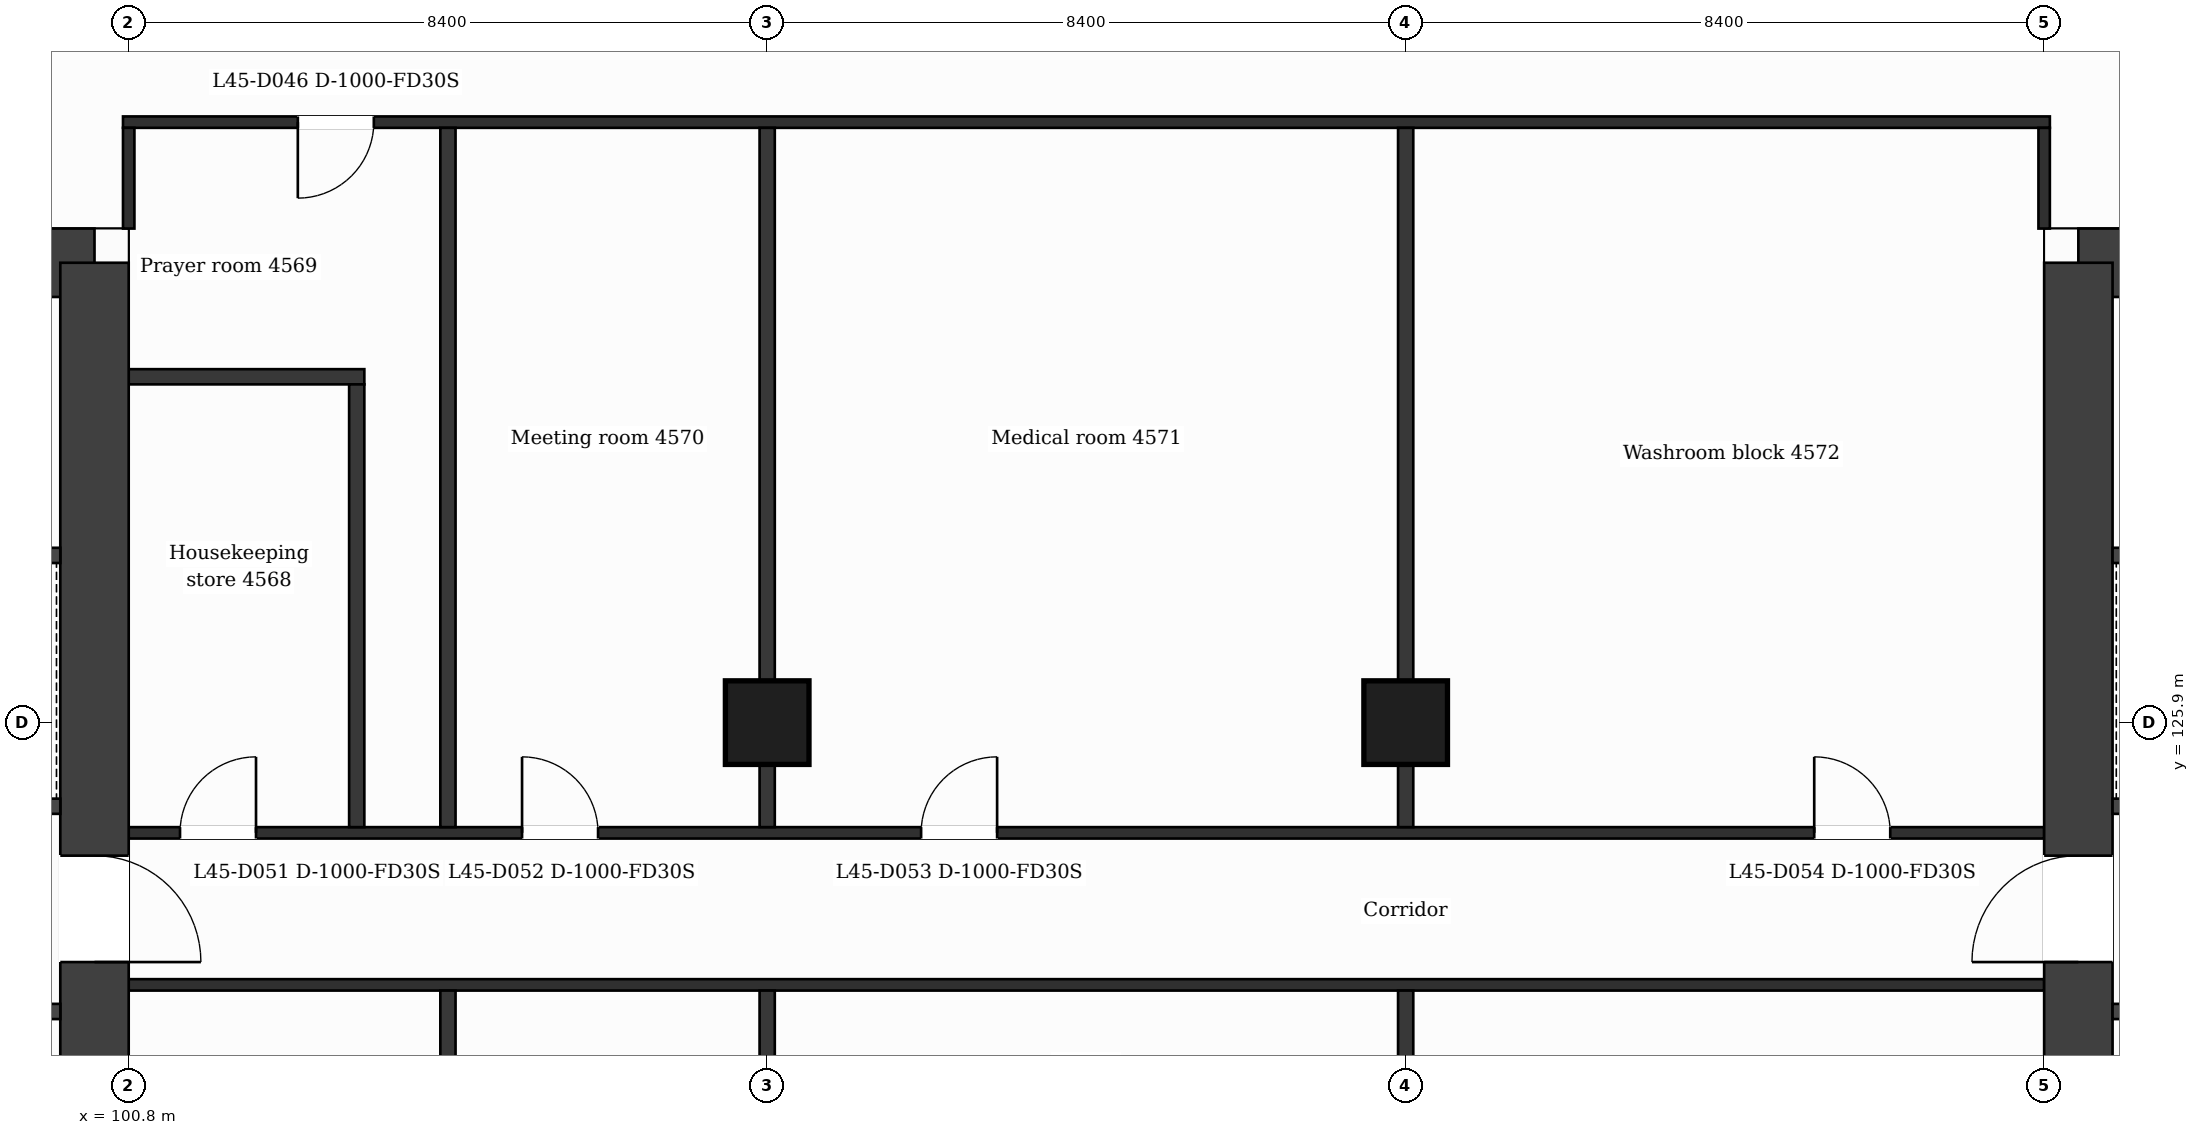
"""IFC4 building model, lengths in metres.
Left out: names, types, materials, properties, quantities, classifications, styles, units other than length and angle.
Written with IfcOpenShell. Run it as: python <this file> out.ifc"""

import sys

from ifc_helpers import new_model, si_unit, direction, frame, frame_2d, origin, origin_2d, place, context, subcontext, project, spatial, rectangle, extrude, element, fill, save


model = new_model("IFC4")
c1 = context("Model", 3, precision=1e-05, world=origin(), true_north=direction((0.0, 1.0)))
c2 = subcontext(c1, "Body", "Model", "MODEL_VIEW")
j1 = project(units=[si_unit("LENGTHUNIT", "METRE"), si_unit("PLANEANGLEUNIT", "RADIAN")], contexts=[c1])
p1 = place(None, origin())
s1 = spatial("IfcSite", under=j1, at=p1, CompositionType="ELEMENT")
p2 = place(p1, origin())
s2 = spatial("IfcBuilding", under=s1, at=p2, CompositionType="ELEMENT")
p3 = place(p2, frame((0.0, 0.0, 188.5)))
s3 = spatial("IfcBuildingStorey", under=s2, at=p3, CompositionType="ELEMENT", Elevation=188.5)
p4 = place(p3, frame((89.024, 131.95, 0.0), z_axis=(0.0, 0.0, 1.0), x_axis=(1.0, 0.0, 0.0)))
e1 = element("IfcWall", 1, at=p4, inside=s3, PredefinedType="SHEAR", context=c2, shape_type="SweptSolid", body=[
    extrude(rectangle(XDim=11.326, YDim=0.9, at=frame_2d((5.663, 0.0))), origin(), (0.0, 0.0, 1.0), 3.7),
])
p5 = place(p4, frame((6.739, 0.0, 0.0)))
e2 = element("IfcOpeningElement", 2, at=p5, cuts=e1, PredefinedType="OPENING", context=c2, shape_type="SweptSolid", body=[
    extrude(rectangle(XDim=1.2, YDim=2.1, at=frame_2d((0.6, 1.05))), frame((0.0, 0.46, 0.0), z_axis=(0.0, -1.0, 0.0), x_axis=(1.0, 0.0, 0.0)), (0.0, 0.0, 1.0), 0.92),
])
p6 = place(p3, frame((100.35, 131.95, 0.0), z_axis=(0.0, 0.0, 1.0), x_axis=(0.0, -1.0, 0.0)))
e3 = element("IfcWall", 3, at=p6, inside=s3, PredefinedType="SHEAR", context=c2, shape_type="SweptSolid", body=[
    extrude(rectangle(XDim=21.1, YDim=0.9, at=frame_2d((10.55, 0.0))), origin(), (0.0, 0.0, 1.0), 3.7),
])
p7 = place(p6, frame((7.8, 0.0, 0.0)))
e4 = element("IfcOpeningElement", 4, at=p7, cuts=e3, PredefinedType="OPENING", context=c2, shape_type="SweptSolid", body=[
    extrude(rectangle(XDim=1.4, YDim=2.1, at=frame_2d((0.7, 1.05))), frame((0.0, 0.46, 0.0), z_axis=(0.0, -1.0, 0.0), x_axis=(1.0, 0.0, 0.0)), (0.0, 0.0, 1.0), 0.92),
])
p8 = place(p3, frame((126.45, 131.95, 0.0), z_axis=(0.0, 0.0, 1.0), x_axis=(1.0, 0.0, 0.0)))
e5 = element("IfcWall", 5, at=p8, inside=s3, PredefinedType="SHEAR", context=c2, shape_type="SweptSolid", body=[
    extrude(rectangle(XDim=11.326, YDim=0.9, at=frame_2d((5.663, 0.0))), origin(), (0.0, 0.0, 1.0), 3.7),
])
p9 = place(p8, frame((3.386, 0.0, 0.0)))
e6 = element("IfcOpeningElement", 6, at=p9, cuts=e5, PredefinedType="OPENING", context=c2, shape_type="SweptSolid", body=[
    extrude(rectangle(XDim=1.2, YDim=2.1, at=frame_2d((0.6, 1.05))), frame((0.0, 0.46, 0.0), z_axis=(0.0, -1.0, 0.0), x_axis=(1.0, 0.0, 0.0)), (0.0, 0.0, 1.0), 0.92),
])
p10 = place(p3, frame((126.45, 110.85, 0.0), z_axis=(0.0, 0.0, 1.0), x_axis=(0.0, 1.0, 0.0)))
e7 = element("IfcWall", 7, at=p10, inside=s3, PredefinedType="SHEAR", context=c2, shape_type="SweptSolid", body=[
    extrude(rectangle(XDim=21.1, YDim=0.9, at=frame_2d((10.55, 0.0))), origin(), (0.0, 0.0, 1.0), 3.7),
])
p11 = place(p10, frame((11.9, 0.0, 0.0)))
e8 = element("IfcOpeningElement", 8, at=p11, cuts=e7, PredefinedType="OPENING", context=c2, shape_type="SweptSolid", body=[
    extrude(rectangle(XDim=1.4, YDim=2.1, at=frame_2d((0.7, 1.05))), frame((0.0, 0.46, 0.0), z_axis=(0.0, -1.0, 0.0), x_axis=(1.0, 0.0, 0.0)), (0.0, 0.0, 1.0), 0.92),
])
for number, where, z_axis, x_axis in (
    (9, (109.2, 125.9, 0.0), (0.0, 0.0, 1.0), (1.0, 0.0, 0.0)),
    (10, (117.6, 125.9, 0.0), (0.0, 0.0, 1.0), (1.0, 0.0, 0.0)),
):
    element("IfcColumn", number, at=place(p3, frame(where, z_axis=z_axis, x_axis=x_axis)), inside=s3, PredefinedType="COLUMN", context=c2, shape_type="SweptSolid", body=[
        extrude(rectangle(XDim=1.1, YDim=1.1, at=origin_2d()), origin(), (0.0, 0.0, 1.0), 3.7),
    ])
p12 = place(p3, frame((95.227, 122.1, 0.0), z_axis=(0.0, 0.0, 1.0), x_axis=(1.0, 0.0, 0.0)))
e11 = element("IfcWall", 11, at=p12, inside=s3, PredefinedType="PARTITIONING", context=c2, shape_type="SweptSolid", body=[
    extrude(rectangle(XDim=4.673, YDim=0.2, at=frame_2d((2.336, 0.0))), origin(), (0.0, 0.0, 1.0), 3.25),
])
p13 = place(p12, frame((1.579, 0.0, 0.0)))
e12 = element("IfcOpeningElement", 12, at=p13, cuts=e11, PredefinedType="OPENING", context=c2, shape_type="SweptSolid", body=[
    extrude(rectangle(XDim=0.9, YDim=2.1, at=frame_2d((0.45, 1.05))), frame((0.0, 0.11, 0.0), z_axis=(0.0, -1.0, 0.0), x_axis=(1.0, 0.0, 0.0)), (0.0, 0.0, 1.0), 0.22),
])
p14 = place(p3, frame((126.9, 122.1, 0.0), z_axis=(0.0, 0.0, 1.0), x_axis=(1.0, 0.0, 0.0)))
e13 = element("IfcWall", 13, at=p14, inside=s3, PredefinedType="PARTITIONING", context=c2, shape_type="SweptSolid", body=[
    extrude(rectangle(XDim=4.673, YDim=0.2, at=frame_2d((2.336, 0.0))), origin(), (0.0, 0.0, 1.0), 3.25),
])
p15 = place(p14, frame((1.579, 0.0, 0.0)))
e14 = element("IfcOpeningElement", 14, at=p15, cuts=e13, PredefinedType="OPENING", context=c2, shape_type="SweptSolid", body=[
    extrude(rectangle(XDim=0.9, YDim=2.1, at=frame_2d((0.45, 1.05))), frame((0.0, 0.11, 0.0), z_axis=(0.0, -1.0, 0.0), x_axis=(1.0, 0.0, 0.0)), (0.0, 0.0, 1.0), 0.22),
])
p16 = place(p3, frame((100.8, 122.45, 0.0), z_axis=(0.0, 0.0, 1.0), x_axis=(1.0, 0.0, 0.0)))
e15 = element("IfcWall", 15, at=p16, inside=s3, PredefinedType="PARTITIONING", context=c2, shape_type="SweptSolid", body=[
    extrude(rectangle(XDim=25.2, YDim=0.15, at=frame_2d((12.6, 0.0))), origin(), (0.0, 0.0, 1.0), 3.25),
])
p17 = place(p3, frame((100.8, 124.45, 0.0), z_axis=(0.0, 0.0, 1.0), x_axis=(1.0, 0.0, 0.0)))
e16 = element("IfcWall", 16, at=p17, inside=s3, PredefinedType="PARTITIONING", context=c2, shape_type="SweptSolid", body=[
    extrude(rectangle(XDim=25.2, YDim=0.15, at=frame_2d((12.6, 0.0))), origin(), (0.0, 0.0, 1.0), 3.25),
])
p18 = place(p17, frame((0.675, 0.0, 0.0)))
e17 = element("IfcOpeningElement", 17, at=p18, cuts=e16, PredefinedType="OPENING", context=c2, shape_type="SweptSolid", body=[
    extrude(rectangle(XDim=1.0, YDim=2.1, at=frame_2d((0.5, 1.05))), frame((0.0, 0.085, 0.0), z_axis=(0.0, -1.0, 0.0), x_axis=(1.0, 0.0, 0.0)), (0.0, 0.0, 1.0), 0.17),
])
p19 = place(p17, frame((5.175, 0.0, 0.0)))
e18 = element("IfcOpeningElement", 18, at=p19, cuts=e16, PredefinedType="OPENING", context=c2, shape_type="SweptSolid", body=[
    extrude(rectangle(XDim=1.0, YDim=2.1, at=frame_2d((0.5, 1.05))), frame((0.0, 0.085, 0.0), z_axis=(0.0, -1.0, 0.0), x_axis=(1.0, 0.0, 0.0)), (0.0, 0.0, 1.0), 0.17),
])
p20 = place(p17, frame((10.425, 0.0, 0.0)))
e19 = element("IfcOpeningElement", 19, at=p20, cuts=e16, PredefinedType="OPENING", context=c2, shape_type="SweptSolid", body=[
    extrude(rectangle(XDim=1.0, YDim=2.1, at=frame_2d((0.5, 1.05))), frame((0.0, 0.085, 0.0), z_axis=(0.0, -1.0, 0.0), x_axis=(1.0, 0.0, 0.0)), (0.0, 0.0, 1.0), 0.17),
])
p21 = place(p17, frame((22.175, 0.0, 0.0)))
e20 = element("IfcOpeningElement", 20, at=p21, cuts=e16, PredefinedType="OPENING", context=c2, shape_type="SweptSolid", body=[
    extrude(rectangle(XDim=1.0, YDim=2.1, at=frame_2d((0.5, 1.05))), frame((0.0, 0.085, 0.0), z_axis=(0.0, -1.0, 0.0), x_axis=(1.0, 0.0, 0.0)), (0.0, 0.0, 1.0), 0.17),
])
p22 = place(p3, frame((92.702, 124.8, 0.0), z_axis=(0.0, 0.0, 1.0), x_axis=(1.0, 0.0, 0.0)))
e21 = element("IfcWall", 21, at=p22, inside=s3, PredefinedType="PARTITIONING", context=c2, shape_type="SweptSolid", body=[
    extrude(rectangle(XDim=7.198, YDim=0.2, at=frame_2d((3.599, 0.0))), origin(), (0.0, 0.0, 1.0), 3.25),
])
p23 = place(p22, frame((5.609, 0.0, 0.0)))
e22 = element("IfcOpeningElement", 22, at=p23, cuts=e21, PredefinedType="OPENING", context=c2, shape_type="SweptSolid", body=[
    extrude(rectangle(XDim=1.1, YDim=2.1, at=frame_2d((0.55, 1.05))), frame((0.0, 0.11, 0.0), z_axis=(0.0, -1.0, 0.0), x_axis=(1.0, 0.0, 0.0)), (0.0, 0.0, 1.0), 0.22),
])
p24 = place(p3, frame((126.9, 124.8, 0.0), z_axis=(0.0, 0.0, 1.0), x_axis=(1.0, 0.0, 0.0)))
e23 = element("IfcWall", 23, at=p24, inside=s3, PredefinedType="PARTITIONING", context=c2, shape_type="SweptSolid", body=[
    extrude(rectangle(XDim=4.715, YDim=0.2, at=frame_2d((2.358, 0.0))), origin(), (0.0, 0.0, 1.0), 3.25),
])
p25 = place(p24, frame((0.573, 0.0, 0.0)))
e24 = element("IfcOpeningElement", 24, at=p25, cuts=e23, PredefinedType="OPENING", context=c2, shape_type="SweptSolid", body=[
    extrude(rectangle(XDim=1.1, YDim=2.1, at=frame_2d((0.55, 1.05))), frame((0.0, 0.11, 0.0), z_axis=(0.0, -1.0, 0.0), x_axis=(1.0, 0.0, 0.0)), (0.0, 0.0, 1.0), 0.22),
])
p26 = place(p3, frame((92.827, 128.1, 0.0), z_axis=(0.0, 0.0, 1.0), x_axis=(1.0, 0.0, 0.0)))
e25 = element("IfcWall", 25, at=p26, inside=s3, PredefinedType="PARTITIONING", context=c2, shape_type="SweptSolid", body=[
    extrude(rectangle(XDim=7.073, YDim=0.2, at=frame_2d((3.537, 0.0))), origin(), (0.0, 0.0, 1.0), 3.25),
])
p27 = place(p26, frame((2.847, 0.0, 0.0)))
e26 = element("IfcOpeningElement", 26, at=p27, cuts=e25, PredefinedType="OPENING", context=c2, shape_type="SweptSolid", body=[
    extrude(rectangle(XDim=1.1, YDim=2.1, at=frame_2d((0.55, 1.05))), frame((0.0, 0.11, 0.0), z_axis=(0.0, -1.0, 0.0), x_axis=(1.0, 0.0, 0.0)), (0.0, 0.0, 1.0), 0.22),
])
p28 = place(p3, frame((126.9, 128.1, 0.0), z_axis=(0.0, 0.0, 1.0), x_axis=(1.0, 0.0, 0.0)))
e27 = element("IfcWall", 27, at=p28, inside=s3, PredefinedType="PARTITIONING", context=c2, shape_type="SweptSolid", body=[
    extrude(rectangle(XDim=4.715, YDim=0.2, at=frame_2d((2.358, 0.0))), origin(), (0.0, 0.0, 1.0), 3.25),
])
p29 = place(p28, frame((3.126, 0.0, 0.0)))
e28 = element("IfcOpeningElement", 28, at=p29, cuts=e27, PredefinedType="OPENING", context=c2, shape_type="SweptSolid", body=[
    extrude(rectangle(XDim=1.1, YDim=2.1, at=frame_2d((0.55, 1.05))), frame((0.0, 0.11, 0.0), z_axis=(0.0, -1.0, 0.0), x_axis=(1.0, 0.0, 0.0)), (0.0, 0.0, 1.0), 0.22),
])
p30 = place(p3, frame((100.8, 130.45, 0.0), z_axis=(0.0, 0.0, 1.0), x_axis=(1.0, 0.0, 0.0)))
e29 = element("IfcWall", 29, at=p30, inside=s3, PredefinedType="PARTITIONING", context=c2, shape_type="SweptSolid", body=[
    extrude(rectangle(XDim=3.1, YDim=0.2, at=frame_2d((1.55, 0.0))), origin(), (0.0, 0.0, 1.0), 3.25),
])
p31 = place(p3, frame((100.725, 133.8, 0.0), z_axis=(0.0, 0.0, 1.0), x_axis=(1.0, 0.0, 0.0)))
e30 = element("IfcWall", 30, at=p31, inside=s3, PredefinedType="PARTITIONING", context=c2, shape_type="SweptSolid", body=[
    extrude(rectangle(XDim=25.35, YDim=0.15, at=frame_2d((12.675, 0.0))), origin(), (0.0, 0.0, 1.0), 3.25),
])
p32 = place(p31, frame((2.3, 0.0, 0.0)))
e31 = element("IfcOpeningElement", 31, at=p32, cuts=e30, PredefinedType="OPENING", context=c2, shape_type="SweptSolid", body=[
    extrude(rectangle(XDim=1.0, YDim=2.1, at=frame_2d((0.5, 1.05))), frame((0.0, 0.085, 0.0), z_axis=(0.0, -1.0, 0.0), x_axis=(1.0, 0.0, 0.0)), (0.0, 0.0, 1.0), 0.17),
])
p33 = place(p3, frame((100.8, 132.4, 0.0), z_axis=(0.0, 0.0, 1.0), x_axis=(0.0, 1.0, 0.0)))
e32 = element("IfcWall", 32, at=p33, inside=s3, PredefinedType="PARTITIONING", context=c2, shape_type="SweptSolid", body=[
    extrude(rectangle(XDim=1.325, YDim=0.15, at=frame_2d((0.663, 0.0))), origin(), (0.0, 0.0, 1.0), 3.25),
])
p34 = place(p3, frame((103.8, 124.525, 0.0), z_axis=(0.0, 0.0, 1.0), x_axis=(0.0, 1.0, 0.0)))
e33 = element("IfcWall", 33, at=p34, inside=s3, PredefinedType="PARTITIONING", context=c2, shape_type="SweptSolid", body=[
    extrude(rectangle(XDim=5.825, YDim=0.2, at=frame_2d((2.913, 0.0))), origin(), (0.0, 0.0, 1.0), 3.25),
])
p35 = place(p3, frame((105.0, 109.075, 0.0), z_axis=(0.0, 0.0, 1.0), x_axis=(0.0, 1.0, 0.0)))
e34 = element("IfcWall", 34, at=p35, inside=s3, PredefinedType="PARTITIONING", context=c2, shape_type="SweptSolid", body=[
    extrude(rectangle(XDim=13.3, YDim=0.2, at=frame_2d((6.65, 0.0))), origin(), (0.0, 0.0, 1.0), 3.25),
])
p36 = place(p3, frame((105.0, 124.525, 0.0), z_axis=(0.0, 0.0, 1.0), x_axis=(0.0, 1.0, 0.0)))
e35 = element("IfcWall", 35, at=p36, inside=s3, PredefinedType="PARTITIONING", context=c2, shape_type="SweptSolid", body=[
    extrude(rectangle(XDim=9.2, YDim=0.2, at=frame_2d((4.6, 0.0))), origin(), (0.0, 0.0, 1.0), 3.25),
])
p37 = place(p3, frame((109.2, 109.075, 0.0), z_axis=(0.0, 0.0, 1.0), x_axis=(0.0, 1.0, 0.0)))
e36 = element("IfcWall", 36, at=p37, inside=s3, PredefinedType="PARTITIONING", context=c2, shape_type="SweptSolid", body=[
    extrude(rectangle(XDim=13.3, YDim=0.2, at=frame_2d((6.65, 0.0))), origin(), (0.0, 0.0, 1.0), 3.25),
])
p38 = place(p3, frame((109.2, 124.525, 0.0), z_axis=(0.0, 0.0, 1.0), x_axis=(0.0, 1.0, 0.0)))
e37 = element("IfcWall", 37, at=p38, inside=s3, PredefinedType="PARTITIONING", context=c2, shape_type="SweptSolid", body=[
    extrude(rectangle(XDim=9.2, YDim=0.2, at=frame_2d((4.6, 0.0))), origin(), (0.0, 0.0, 1.0), 3.25),
])
p39 = place(p3, frame((117.6, 109.075, 0.0), z_axis=(0.0, 0.0, 1.0), x_axis=(0.0, 1.0, 0.0)))
e38 = element("IfcWall", 38, at=p39, inside=s3, PredefinedType="PARTITIONING", context=c2, shape_type="SweptSolid", body=[
    extrude(rectangle(XDim=13.3, YDim=0.2, at=frame_2d((6.65, 0.0))), origin(), (0.0, 0.0, 1.0), 3.25),
])
p40 = place(p3, frame((117.6, 124.525, 0.0), z_axis=(0.0, 0.0, 1.0), x_axis=(0.0, 1.0, 0.0)))
e39 = element("IfcWall", 39, at=p40, inside=s3, PredefinedType="PARTITIONING", context=c2, shape_type="SweptSolid", body=[
    extrude(rectangle(XDim=9.2, YDim=0.2, at=frame_2d((4.6, 0.0))), origin(), (0.0, 0.0, 1.0), 3.25),
])
p41 = place(p3, frame((126.0, 132.4, 0.0), z_axis=(0.0, 0.0, 1.0), x_axis=(0.0, 1.0, 0.0)))
e40 = element("IfcWall", 40, at=p41, inside=s3, PredefinedType="PARTITIONING", context=c2, shape_type="SweptSolid", body=[
    extrude(rectangle(XDim=1.325, YDim=0.15, at=frame_2d((0.663, 0.0))), origin(), (0.0, 0.0, 1.0), 3.25),
])
p42 = place(p32, origin())
e41 = element("IfcDoor", 41, at=p42, inside=s3, OperationType="SINGLE_SWING_LEFT", PredefinedType="DOOR", context=c2, shape_type="SweptSolid", body=[
    extrude(rectangle(XDim=1.0, YDim=2.1, at=frame_2d((0.5, 1.05))), frame((0.0, 0.025, 0.0), z_axis=(0.0, -1.0, 0.0), x_axis=(1.0, 0.0, 0.0)), (0.0, 0.0, 1.0), 0.05),
])
fill(e31, e41)
p43 = place(p18, origin())
e42 = element("IfcDoor", 42, at=p43, inside=s3, OperationType="SINGLE_SWING_RIGHT", PredefinedType="DOOR", context=c2, shape_type="SweptSolid", body=[
    extrude(rectangle(XDim=1.0, YDim=2.1, at=frame_2d((0.5, 1.05))), frame((0.0, 0.025, 0.0), z_axis=(0.0, -1.0, 0.0), x_axis=(1.0, 0.0, 0.0)), (0.0, 0.0, 1.0), 0.05),
])
fill(e17, e42)
p44 = place(p19, origin())
e43 = element("IfcDoor", 43, at=p44, inside=s3, OperationType="SINGLE_SWING_LEFT", PredefinedType="DOOR", context=c2, shape_type="SweptSolid", body=[
    extrude(rectangle(XDim=1.0, YDim=2.1, at=frame_2d((0.5, 1.05))), frame((0.0, 0.025, 0.0), z_axis=(0.0, -1.0, 0.0), x_axis=(1.0, 0.0, 0.0)), (0.0, 0.0, 1.0), 0.05),
])
fill(e18, e43)
p45 = place(p20, origin())
e44 = element("IfcDoor", 44, at=p45, inside=s3, OperationType="SINGLE_SWING_RIGHT", PredefinedType="DOOR", context=c2, shape_type="SweptSolid", body=[
    extrude(rectangle(XDim=1.0, YDim=2.1, at=frame_2d((0.5, 1.05))), frame((0.0, 0.025, 0.0), z_axis=(0.0, -1.0, 0.0), x_axis=(1.0, 0.0, 0.0)), (0.0, 0.0, 1.0), 0.05),
])
fill(e19, e44)
p46 = place(p21, origin())
e45 = element("IfcDoor", 45, at=p46, inside=s3, OperationType="SINGLE_SWING_LEFT", PredefinedType="DOOR", context=c2, shape_type="SweptSolid", body=[
    extrude(rectangle(XDim=1.0, YDim=2.1, at=frame_2d((0.5, 1.05))), frame((0.0, 0.025, 0.0), z_axis=(0.0, -1.0, 0.0), x_axis=(1.0, 0.0, 0.0)), (0.0, 0.0, 1.0), 0.05),
])
fill(e20, e45)
p47 = place(p7, origin())
e46 = element("IfcDoor", 46, at=p47, inside=s3, OperationType="SINGLE_SWING_RIGHT", PredefinedType="DOOR", context=c2, shape_type="SweptSolid", body=[
    extrude(rectangle(XDim=1.4, YDim=2.1, at=frame_2d((0.7, 1.05))), frame((0.0, 0.025, 0.0), z_axis=(0.0, -1.0, 0.0), x_axis=(1.0, 0.0, 0.0)), (0.0, 0.0, 1.0), 0.05),
])
fill(e4, e46)
p48 = place(p11, origin())
e47 = element("IfcDoor", 47, at=p48, inside=s3, OperationType="SINGLE_SWING_LEFT", PredefinedType="DOOR", context=c2, shape_type="SweptSolid", body=[
    extrude(rectangle(XDim=1.4, YDim=2.1, at=frame_2d((0.7, 1.05))), frame((0.0, 0.025, 0.0), z_axis=(0.0, -1.0, 0.0), x_axis=(1.0, 0.0, 0.0)), (0.0, 0.0, 1.0), 0.05),
])
fill(e8, e47)
save(model, sys.argv[1])
